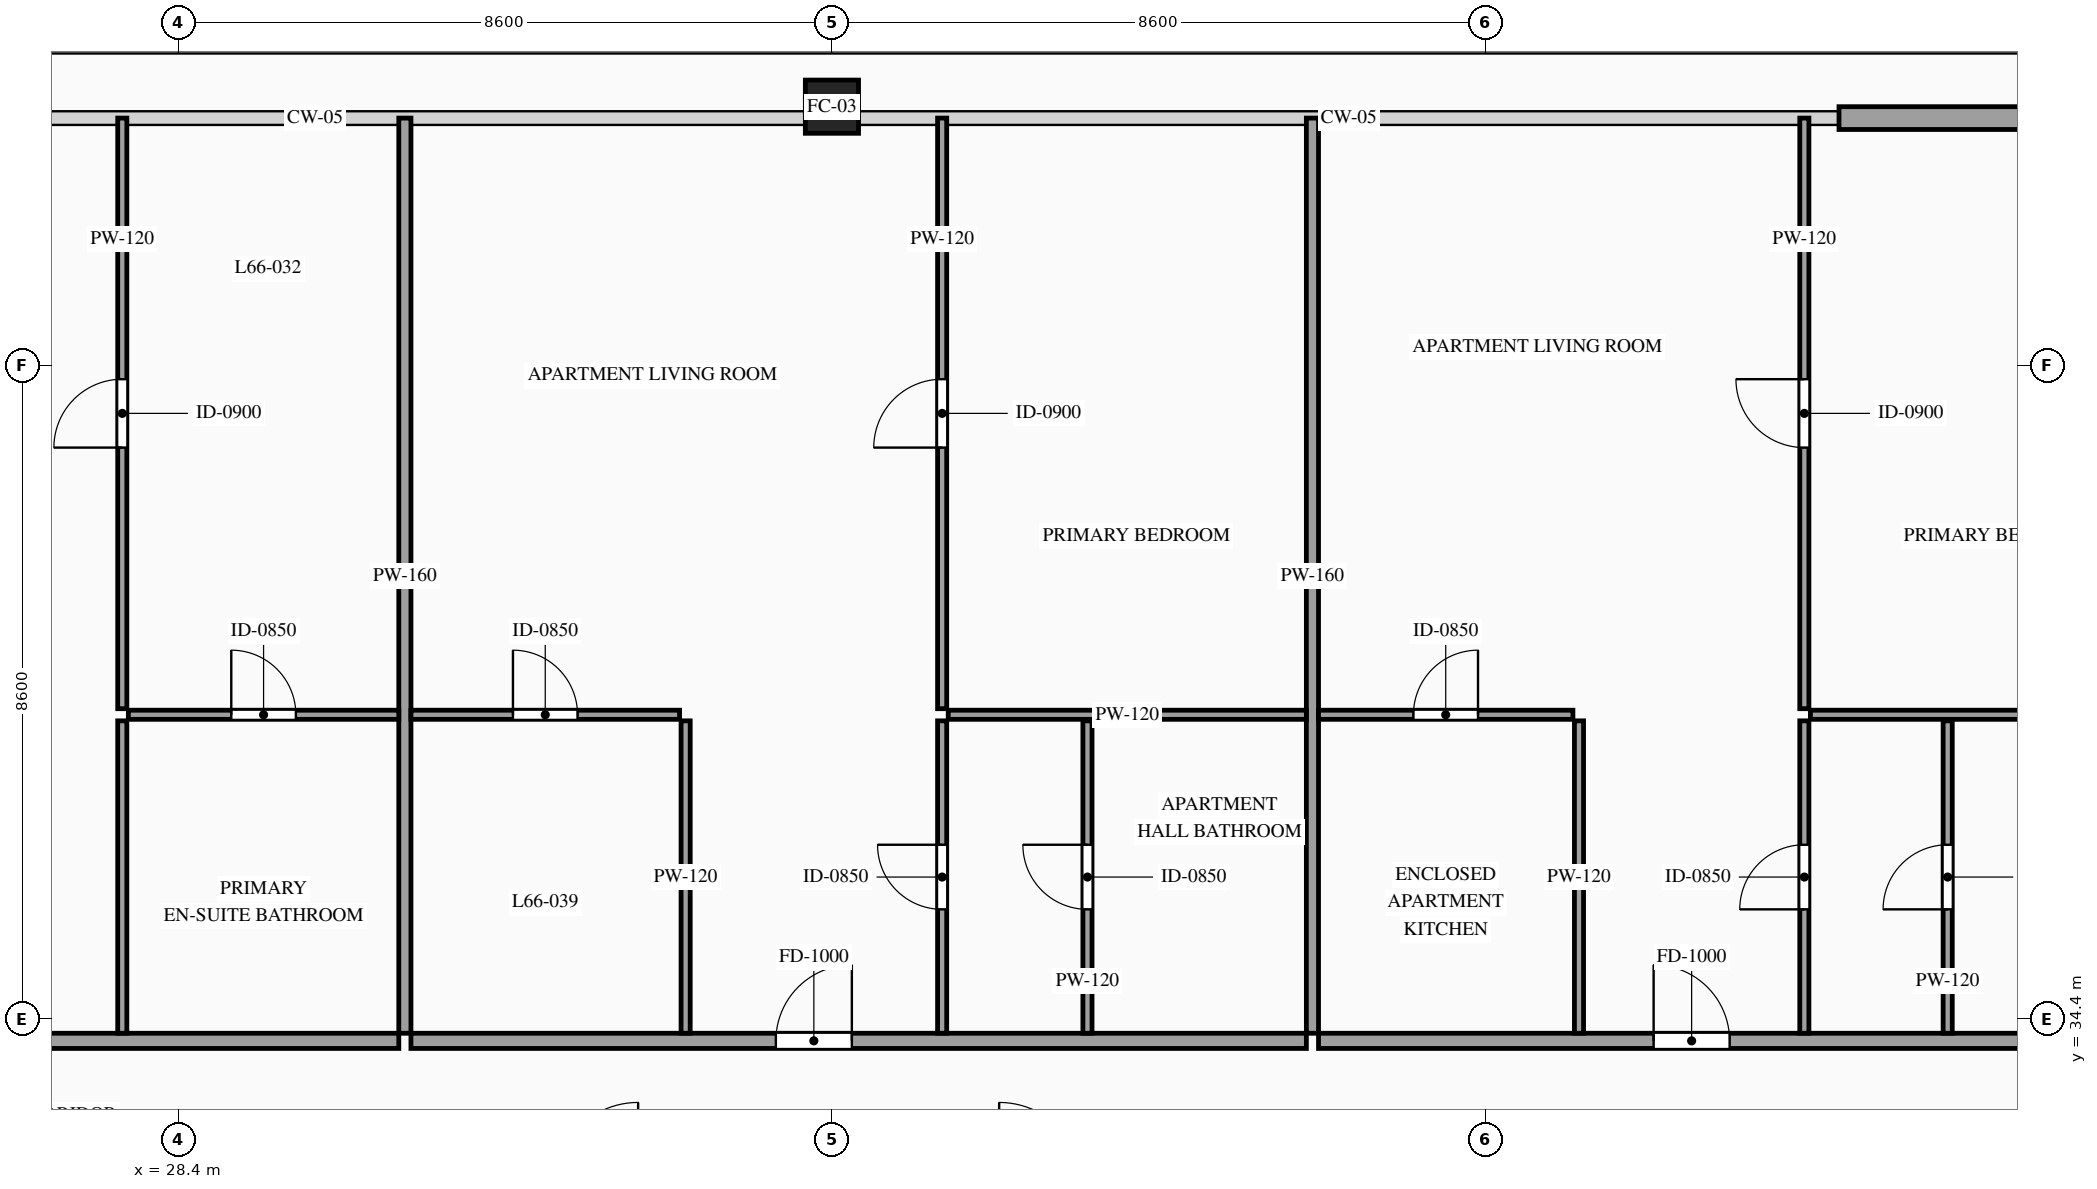
"""IFC4 building model, lengths in metres.
Left out: names, types, materials, properties, quantities, classifications, styles, units other than length and angle.
Written with IfcOpenShell. Run it as: python <this file> out.ifc"""

import sys

from ifc_helpers import new_model, si_unit, direction, frame, frame_2d, origin, origin_2d, place, context, subcontext, project, spatial, rectangle, hollow_rectangle, extrude, source, transform, mapped, element, fill, save


model = new_model("IFC4")
c1 = context("Model", 3, precision=1e-05, world=origin(), true_north=direction((0.0, 1.0)))
c2 = subcontext(c1, "Body", "Model", "MODEL_VIEW")
j1 = project(units=[si_unit("LENGTHUNIT", "METRE"), si_unit("PLANEANGLEUNIT", "RADIAN")], contexts=[c1])
p1 = place(None, origin())
s1 = spatial("IfcSite", under=j1, at=p1, CompositionType="ELEMENT")
p2 = place(p1, origin())
s2 = spatial("IfcBuilding", under=s1, at=p2, CompositionType="ELEMENT")
p3 = place(p2, frame((0.0, 0.0, 248.6)))
s3 = spatial("IfcBuildingStorey", under=s2, at=p3, CompositionType="ELEMENT", Elevation=248.6)
m1 = source(origin(), c2, "Body", "SweptSolid", [
    extrude(hollow_rectangle(XDim=0.7, YDim=0.7, WallThickness=0.032, at=origin_2d()), origin(), (0.0, 0.0, 1.0), 3.5),
])
p4 = place(p3, frame((37.0, 46.4, 0.0), z_axis=(0.0, 0.0, 1.0), x_axis=(1.0, 0.0, 0.0)))
e1 = element("IfcColumn", 1, at=p4, inside=s3, PredefinedType="COLUMN", context=c2, shape_type="MappedRepresentation", body=[
    mapped(m1, transform((0.0, 0.0, 0.0), scale=1.0)),
])
m2 = source(origin(), c2, "Body", "SweptSolid", [
    extrude(rectangle(XDim=3.15, YDim=0.3, at=frame_2d((1.575, 0.0))), origin(), (0.0, 0.0, 1.0), 2.835),
])
p5 = place(p3, frame((50.25, 46.25, 0.0), z_axis=(0.0, 0.0, 1.0), x_axis=(1.0, 0.0, 0.0)))
e2 = element("IfcWall", 2, at=p5, inside=s3, PredefinedType="SOLIDWALL", context=c2, shape_type="MappedRepresentation", body=[
    mapped(m2, transform((0.0, 0.0, 0.0), scale=1.0)),
])
p6 = place(p3, frame((19.44, 34.11, 0.0), z_axis=(0.0, 0.0, 1.0), x_axis=(1.0, 0.0, 0.0)))
e3 = element("IfcWall", 3, at=p6, inside=s3, PredefinedType="PARTITIONING", context=c2, shape_type="SweptSolid", body=[
    extrude(rectangle(XDim=11.861, YDim=0.2, at=frame_2d((5.931, 0.0))), origin(), (0.0, 0.0, 1.0), 3.28),
])
p7 = place(p6, frame((6.238, 0.0, 0.0)))
e4 = element("IfcOpeningElement", 4, at=p7, cuts=e3, PredefinedType="OPENING", context=c2, shape_type="SweptSolid", body=[
    extrude(rectangle(XDim=1.0, YDim=2.2, at=frame_2d((0.5, 1.1))), frame((0.0, 0.115, 0.0), z_axis=(0.0, -1.0, 0.0), x_axis=(1.0, 0.0, 0.0)), (0.0, 0.0, 1.0), 0.23),
])
m3 = source(origin(), c2, "Body", "SweptSolid", [
    extrude(rectangle(XDim=12.04, YDim=0.16, at=frame_2d((6.02, 0.0))), origin(), (0.0, 0.0, 1.0), 3.28),
])
p8 = place(p3, frame((31.381, 34.21, 0.0), z_axis=(0.0, 0.0, 1.0), x_axis=(0.0, 1.0, 0.0)))
e5 = element("IfcWall", 5, at=p8, inside=s3, PredefinedType="PARTITIONING", context=c2, shape_type="MappedRepresentation", body=[
    mapped(m3, transform((0.0, 0.0, 0.0), scale=1.0)),
])
p9 = place(p3, frame((27.743, 38.4, 0.0), z_axis=(0.0, 0.0, 1.0), x_axis=(1.0, 0.0, 0.0)))
e6 = element("IfcWall", 6, at=p9, inside=s3, PredefinedType="PARTITIONING", context=c2, shape_type="SweptSolid", body=[
    extrude(rectangle(XDim=3.558, YDim=0.12, at=frame_2d((1.779, 0.0))), origin(), (0.0, 0.0, 1.0), 3.28),
])
p10 = place(p9, frame((1.354, 0.0, 0.0)))
e7 = element("IfcOpeningElement", 7, at=p10, cuts=e6, PredefinedType="OPENING", context=c2, shape_type="SweptSolid", body=[
    extrude(rectangle(XDim=0.85, YDim=2.1, at=frame_2d((0.425, 1.05))), frame((0.0, 0.075, 0.0), z_axis=(0.0, -1.0, 0.0), x_axis=(1.0, 0.0, 0.0)), (0.0, 0.0, 1.0), 0.15),
])
m4 = source(origin(), c2, "Body", "SweptSolid", [
    extrude(rectangle(XDim=4.11, YDim=0.12, at=frame_2d((2.055, 0.0))), origin(), (0.0, 0.0, 1.0), 3.28),
])
p11 = place(p3, frame((27.663, 34.21, 0.0), z_axis=(0.0, 0.0, 1.0), x_axis=(0.0, 1.0, 0.0)))
e8 = element("IfcWall", 8, at=p11, inside=s3, PredefinedType="PARTITIONING", context=c2, shape_type="MappedRepresentation", body=[
    mapped(m4, transform((0.0, 0.0, 0.0), scale=1.0)),
])
p12 = place(p3, frame((27.663, 38.48, 0.0), z_axis=(0.0, 0.0, 1.0), x_axis=(0.0, 1.0, 0.0)))
e9 = element("IfcWall", 9, at=p12, inside=s3, PredefinedType="PARTITIONING", context=c2, shape_type="SweptSolid", body=[
    extrude(rectangle(XDim=7.77, YDim=0.12, at=frame_2d((3.885, 0.0))), origin(), (0.0, 0.0, 1.0), 3.28),
])
p13 = place(p12, frame((3.435, 0.0, 0.0)))
e10 = element("IfcOpeningElement", 10, at=p13, cuts=e9, PredefinedType="OPENING", context=c2, shape_type="SweptSolid", body=[
    extrude(rectangle(XDim=0.9, YDim=2.15, at=frame_2d((0.45, 1.075))), frame((0.0, 0.075, 0.0), z_axis=(0.0, -1.0, 0.0), x_axis=(1.0, 0.0, 0.0)), (0.0, 0.0, 1.0), 0.15),
])
p14 = place(p3, frame((31.461, 34.11, 0.0), z_axis=(0.0, 0.0, 1.0), x_axis=(1.0, 0.0, 0.0)))
e11 = element("IfcWall", 11, at=p14, inside=s3, PredefinedType="PARTITIONING", context=c2, shape_type="SweptSolid", body=[
    extrude(rectangle(XDim=11.781, YDim=0.2, at=frame_2d((5.891, 0.0))), origin(), (0.0, 0.0, 1.0), 3.28),
])
p15 = place(p14, frame((4.801, 0.0, 0.0)))
e12 = element("IfcOpeningElement", 12, at=p15, cuts=e11, PredefinedType="OPENING", context=c2, shape_type="SweptSolid", body=[
    extrude(rectangle(XDim=1.0, YDim=2.2, at=frame_2d((0.5, 1.1))), frame((0.0, 0.115, 0.0), z_axis=(0.0, -1.0, 0.0), x_axis=(1.0, 0.0, 0.0)), (0.0, 0.0, 1.0), 0.23),
])
p16 = place(p3, frame((43.322, 34.21, 0.0), z_axis=(0.0, 0.0, 1.0), x_axis=(0.0, 1.0, 0.0)))
e13 = element("IfcWall", 13, at=p16, inside=s3, PredefinedType="PARTITIONING", context=c2, shape_type="MappedRepresentation", body=[
    mapped(m3, transform((0.0, 0.0, 0.0), scale=1.0)),
])
p17 = place(p3, frame((31.461, 38.4, 0.0), z_axis=(0.0, 0.0, 1.0), x_axis=(1.0, 0.0, 0.0)))
e14 = element("IfcWall", 14, at=p17, inside=s3, PredefinedType="PARTITIONING", context=c2, shape_type="SweptSolid", body=[
    extrude(rectangle(XDim=3.534, YDim=0.12, at=frame_2d((1.767, 0.0))), origin(), (0.0, 0.0, 1.0), 3.28),
])
p18 = place(p17, frame((1.342, 0.0, 0.0)))
e15 = element("IfcOpeningElement", 15, at=p18, cuts=e14, PredefinedType="OPENING", context=c2, shape_type="SweptSolid", body=[
    extrude(rectangle(XDim=0.85, YDim=2.1, at=frame_2d((0.425, 1.05))), frame((0.0, 0.075, 0.0), z_axis=(0.0, -1.0, 0.0), x_axis=(1.0, 0.0, 0.0)), (0.0, 0.0, 1.0), 0.15),
])
p19 = place(p3, frame((35.075, 34.21, 0.0), z_axis=(0.0, 0.0, 1.0), x_axis=(0.0, 1.0, 0.0)))
e16 = element("IfcWall", 16, at=p19, inside=s3, PredefinedType="PARTITIONING", context=c2, shape_type="MappedRepresentation", body=[
    mapped(m4, transform((0.0, 0.0, 0.0), scale=1.0)),
])
p20 = place(p3, frame((40.362, 34.21, 0.0), z_axis=(0.0, 0.0, 1.0), x_axis=(0.0, 1.0, 0.0)))
e17 = element("IfcWall", 17, at=p20, inside=s3, PredefinedType="PARTITIONING", context=c2, shape_type="SweptSolid", body=[
    extrude(rectangle(XDim=4.11, YDim=0.12, at=frame_2d((2.055, 0.0))), origin(), (0.0, 0.0, 1.0), 3.28),
])
p21 = place(p20, frame((1.63, 0.0, 0.0)))
e18 = element("IfcOpeningElement", 18, at=p21, cuts=e17, PredefinedType="OPENING", context=c2, shape_type="SweptSolid", body=[
    extrude(rectangle(XDim=0.85, YDim=2.1, at=frame_2d((0.425, 1.05))), frame((0.0, 0.075, 0.0), z_axis=(0.0, -1.0, 0.0), x_axis=(1.0, 0.0, 0.0)), (0.0, 0.0, 1.0), 0.15),
])
m5 = source(origin(), c2, "Body", "SweptSolid", [
    extrude(rectangle(XDim=4.712, YDim=0.12, at=frame_2d((2.356, 0.0))), origin(), (0.0, 0.0, 1.0), 3.28),
])
p22 = place(p3, frame((38.53, 38.4, 0.0), z_axis=(0.0, 0.0, 1.0), x_axis=(1.0, 0.0, 0.0)))
e19 = element("IfcWall", 19, at=p22, inside=s3, PredefinedType="PARTITIONING", context=c2, shape_type="MappedRepresentation", body=[
    mapped(m5, transform((0.0, 0.0, 0.0), scale=1.0)),
])
p23 = place(p3, frame((38.45, 38.48, 0.0), z_axis=(0.0, 0.0, 1.0), x_axis=(0.0, 1.0, 0.0)))
e20 = element("IfcWall", 20, at=p23, inside=s3, PredefinedType="PARTITIONING", context=c2, shape_type="SweptSolid", body=[
    extrude(rectangle(XDim=7.77, YDim=0.12, at=frame_2d((3.885, 0.0))), origin(), (0.0, 0.0, 1.0), 3.28),
])
p24 = place(p23, frame((3.435, 0.0, 0.0)))
e21 = element("IfcOpeningElement", 21, at=p24, cuts=e20, PredefinedType="OPENING", context=c2, shape_type="SweptSolid", body=[
    extrude(rectangle(XDim=0.9, YDim=2.15, at=frame_2d((0.45, 1.075))), frame((0.0, 0.075, 0.0), z_axis=(0.0, -1.0, 0.0), x_axis=(1.0, 0.0, 0.0)), (0.0, 0.0, 1.0), 0.15),
])
p25 = place(p3, frame((38.45, 34.21, 0.0), z_axis=(0.0, 0.0, 1.0), x_axis=(0.0, 1.0, 0.0)))
e22 = element("IfcWall", 22, at=p25, inside=s3, PredefinedType="PARTITIONING", context=c2, shape_type="SweptSolid", body=[
    extrude(rectangle(XDim=4.11, YDim=0.12, at=frame_2d((2.055, 0.0))), origin(), (0.0, 0.0, 1.0), 3.28),
])
p26 = place(p25, frame((1.63, 0.0, 0.0)))
e23 = element("IfcOpeningElement", 23, at=p26, cuts=e22, PredefinedType="OPENING", context=c2, shape_type="SweptSolid", body=[
    extrude(rectangle(XDim=0.85, YDim=2.1, at=frame_2d((0.425, 1.05))), frame((0.0, 0.075, 0.0), z_axis=(0.0, -1.0, 0.0), x_axis=(1.0, 0.0, 0.0)), (0.0, 0.0, 1.0), 0.15),
])
p27 = place(p3, frame((43.402, 34.11, 0.0), z_axis=(0.0, 0.0, 1.0), x_axis=(1.0, 0.0, 0.0)))
e24 = element("IfcWall", 24, at=p27, inside=s3, PredefinedType="PARTITIONING", context=c2, shape_type="SweptSolid", body=[
    extrude(rectangle(XDim=11.158, YDim=0.2, at=frame_2d((5.579, 0.0))), origin(), (0.0, 0.0, 1.0), 3.28),
])
p28 = place(p27, frame((4.409, 0.0, 0.0)))
e25 = element("IfcOpeningElement", 25, at=p28, cuts=e24, PredefinedType="OPENING", context=c2, shape_type="SweptSolid", body=[
    extrude(rectangle(XDim=1.0, YDim=2.2, at=frame_2d((0.5, 1.1))), frame((0.0, 0.115, 0.0), z_axis=(0.0, -1.0, 0.0), x_axis=(1.0, 0.0, 0.0)), (0.0, 0.0, 1.0), 0.23),
])
p29 = place(p3, frame((43.402, 38.4, 0.0), z_axis=(0.0, 0.0, 1.0), x_axis=(1.0, 0.0, 0.0)))
e26 = element("IfcWall", 26, at=p29, inside=s3, PredefinedType="PARTITIONING", context=c2, shape_type="SweptSolid", body=[
    extrude(rectangle(XDim=3.347, YDim=0.12, at=frame_2d((1.673, 0.0))), origin(), (0.0, 0.0, 1.0), 3.28),
])
p30 = place(p29, frame((1.249, 0.0, 0.0)))
e27 = element("IfcOpeningElement", 27, at=p30, cuts=e26, PredefinedType="OPENING", context=c2, shape_type="SweptSolid", body=[
    extrude(rectangle(XDim=0.85, YDim=2.1, at=frame_2d((0.425, 1.05))), frame((0.0, 0.075, 0.0), z_axis=(0.0, -1.0, 0.0), x_axis=(1.0, 0.0, 0.0)), (0.0, 0.0, 1.0), 0.15),
])
p31 = place(p3, frame((46.829, 34.21, 0.0), z_axis=(0.0, 0.0, 1.0), x_axis=(0.0, 1.0, 0.0)))
e28 = element("IfcWall", 28, at=p31, inside=s3, PredefinedType="PARTITIONING", context=c2, shape_type="MappedRepresentation", body=[
    mapped(m4, transform((0.0, 0.0, 0.0), scale=1.0)),
])
p32 = place(p3, frame((51.68, 34.21, 0.0), z_axis=(0.0, 0.0, 1.0), x_axis=(0.0, 1.0, 0.0)))
e29 = element("IfcWall", 29, at=p32, inside=s3, PredefinedType="PARTITIONING", context=c2, shape_type="SweptSolid", body=[
    extrude(rectangle(XDim=4.11, YDim=0.12, at=frame_2d((2.055, 0.0))), origin(), (0.0, 0.0, 1.0), 3.28),
])
p33 = place(p32, frame((1.63, 0.0, 0.0)))
e30 = element("IfcOpeningElement", 30, at=p33, cuts=e29, PredefinedType="OPENING", context=c2, shape_type="SweptSolid", body=[
    extrude(rectangle(XDim=0.85, YDim=2.1, at=frame_2d((0.425, 1.05))), frame((0.0, 0.075, 0.0), z_axis=(0.0, -1.0, 0.0), x_axis=(1.0, 0.0, 0.0)), (0.0, 0.0, 1.0), 0.15),
])
m6 = source(origin(), c2, "Body", "SweptSolid", [
    extrude(rectangle(XDim=4.686, YDim=0.12, at=frame_2d((2.343, 0.0))), origin(), (0.0, 0.0, 1.0), 3.28),
])
p34 = place(p3, frame((49.874, 38.4, 0.0), z_axis=(0.0, 0.0, 1.0), x_axis=(1.0, 0.0, 0.0)))
e31 = element("IfcWall", 31, at=p34, inside=s3, PredefinedType="PARTITIONING", context=c2, shape_type="MappedRepresentation", body=[
    mapped(m6, transform((0.0, 0.0, 0.0), scale=1.0)),
])
p35 = place(p3, frame((49.794, 38.48, 0.0), z_axis=(0.0, 0.0, 1.0), x_axis=(0.0, 1.0, 0.0)))
e32 = element("IfcWall", 32, at=p35, inside=s3, PredefinedType="PARTITIONING", context=c2, shape_type="SweptSolid", body=[
    extrude(rectangle(XDim=7.77, YDim=0.12, at=frame_2d((3.885, 0.0))), origin(), (0.0, 0.0, 1.0), 3.28),
])
p36 = place(p35, frame((3.435, 0.0, 0.0)))
e33 = element("IfcOpeningElement", 33, at=p36, cuts=e32, PredefinedType="OPENING", context=c2, shape_type="SweptSolid", body=[
    extrude(rectangle(XDim=0.9, YDim=2.15, at=frame_2d((0.45, 1.075))), frame((0.0, 0.075, 0.0), z_axis=(0.0, -1.0, 0.0), x_axis=(1.0, 0.0, 0.0)), (0.0, 0.0, 1.0), 0.15),
])
p37 = place(p3, frame((49.794, 34.21, 0.0), z_axis=(0.0, 0.0, 1.0), x_axis=(0.0, 1.0, 0.0)))
e34 = element("IfcWall", 34, at=p37, inside=s3, PredefinedType="PARTITIONING", context=c2, shape_type="SweptSolid", body=[
    extrude(rectangle(XDim=4.11, YDim=0.12, at=frame_2d((2.055, 0.0))), origin(), (0.0, 0.0, 1.0), 3.28),
])
p38 = place(p37, frame((1.63, 0.0, 0.0)))
e35 = element("IfcOpeningElement", 35, at=p38, cuts=e34, PredefinedType="OPENING", context=c2, shape_type="SweptSolid", body=[
    extrude(rectangle(XDim=0.85, YDim=2.1, at=frame_2d((0.425, 1.05))), frame((0.0, 0.075, 0.0), z_axis=(0.0, -1.0, 0.0), x_axis=(1.0, 0.0, 0.0)), (0.0, 0.0, 1.0), 0.15),
])
m7 = source(origin(), c2, "Body", "SweptSolid", [
    extrude(rectangle(XDim=0.85, YDim=2.1, at=frame_2d((0.425, 1.05))), frame((0.0, 0.025, 0.0), z_axis=(0.0, -1.0, 0.0), x_axis=(1.0, 0.0, 0.0)), (0.0, 0.0, 1.0), 0.05),
])
p39 = place(p10, origin())
e36 = element("IfcDoor", 36, at=p39, inside=s3, OperationType="SINGLE_SWING_LEFT", PredefinedType="DOOR", context=c2, shape_type="MappedRepresentation", body=[
    mapped(m7, transform((0.0, 0.0, 0.0), scale=1.0)),
])
fill(e7, e36)
m8 = source(origin(), c2, "Body", "SweptSolid", [
    extrude(rectangle(XDim=0.9, YDim=2.15, at=frame_2d((0.45, 1.075))), frame((0.0, 0.025, 0.0), z_axis=(0.0, -1.0, 0.0), x_axis=(1.0, 0.0, 0.0)), (0.0, 0.0, 1.0), 0.05),
])
p40 = place(p13, origin())
e37 = element("IfcDoor", 37, at=p40, inside=s3, OperationType="SINGLE_SWING_LEFT", PredefinedType="DOOR", context=c2, shape_type="MappedRepresentation", body=[
    mapped(m8, transform((0.0, 0.0, 0.0), scale=1.0)),
])
fill(e10, e37)
m9 = source(origin(), c2, "Body", "SweptSolid", [
    extrude(rectangle(XDim=1.0, YDim=2.2, at=frame_2d((0.5, 1.1))), frame((0.0, 0.025, 0.0), z_axis=(0.0, -1.0, 0.0), x_axis=(1.0, 0.0, 0.0)), (0.0, 0.0, 1.0), 0.05),
])
p41 = place(p15, origin())
e38 = element("IfcDoor", 38, at=p41, inside=s3, OperationType="SINGLE_SWING_RIGHT", PredefinedType="DOOR", context=c2, shape_type="MappedRepresentation", body=[
    mapped(m9, transform((0.0, 0.0, 0.0), scale=1.0)),
])
fill(e12, e38)
p42 = place(p18, origin())
e39 = element("IfcDoor", 39, at=p42, inside=s3, OperationType="SINGLE_SWING_LEFT", PredefinedType="DOOR", context=c2, shape_type="MappedRepresentation", body=[
    mapped(m7, transform((0.0, 0.0, 0.0), scale=1.0)),
])
fill(e15, e39)
p43 = place(p21, origin())
e40 = element("IfcDoor", 40, at=p43, inside=s3, OperationType="SINGLE_SWING_RIGHT", PredefinedType="DOOR", context=c2, shape_type="MappedRepresentation", body=[
    mapped(m7, transform((0.0, 0.0, 0.0), scale=1.0)),
])
fill(e18, e40)
p44 = place(p24, origin())
e41 = element("IfcDoor", 41, at=p44, inside=s3, OperationType="SINGLE_SWING_LEFT", PredefinedType="DOOR", context=c2, shape_type="MappedRepresentation", body=[
    mapped(m8, transform((0.0, 0.0, 0.0), scale=1.0)),
])
fill(e21, e41)
p45 = place(p26, origin())
e42 = element("IfcDoor", 42, at=p45, inside=s3, OperationType="SINGLE_SWING_RIGHT", PredefinedType="DOOR", context=c2, shape_type="MappedRepresentation", body=[
    mapped(m7, transform((0.0, 0.0, 0.0), scale=1.0)),
])
fill(e23, e42)
p46 = place(p28, origin())
e43 = element("IfcDoor", 43, at=p46, inside=s3, OperationType="SINGLE_SWING_LEFT", PredefinedType="DOOR", context=c2, shape_type="MappedRepresentation", body=[
    mapped(m9, transform((0.0, 0.0, 0.0), scale=1.0)),
])
fill(e25, e43)
p47 = place(p30, origin())
e44 = element("IfcDoor", 44, at=p47, inside=s3, OperationType="SINGLE_SWING_RIGHT", PredefinedType="DOOR", context=c2, shape_type="MappedRepresentation", body=[
    mapped(m7, transform((0.0, 0.0, 0.0), scale=1.0)),
])
fill(e27, e44)
p48 = place(p33, origin())
e45 = element("IfcDoor", 45, at=p48, inside=s3, OperationType="SINGLE_SWING_LEFT", PredefinedType="DOOR", context=c2, shape_type="MappedRepresentation", body=[
    mapped(m7, transform((0.0, 0.0, 0.0), scale=1.0)),
])
fill(e30, e45)
p49 = place(p36, origin())
e46 = element("IfcDoor", 46, at=p49, inside=s3, OperationType="SINGLE_SWING_RIGHT", PredefinedType="DOOR", context=c2, shape_type="MappedRepresentation", body=[
    mapped(m8, transform((0.0, 0.0, 0.0), scale=1.0)),
])
fill(e33, e46)
p50 = place(p38, origin())
e47 = element("IfcDoor", 47, at=p50, inside=s3, OperationType="SINGLE_SWING_LEFT", PredefinedType="DOOR", context=c2, shape_type="MappedRepresentation", body=[
    mapped(m7, transform((0.0, 0.0, 0.0), scale=1.0)),
])
fill(e35, e47)
save(model, sys.argv[1])
